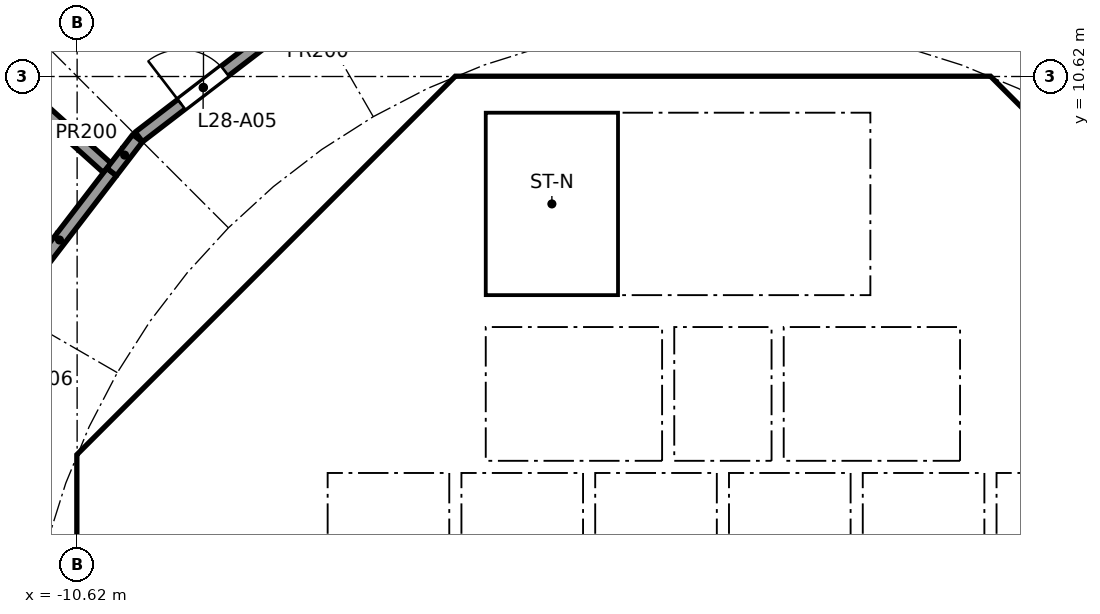
"""IFC4 building model, lengths in metres.
Left out: names, types, materials, properties, quantities, classifications, styles, units other than length and angle.
Written with IfcOpenShell. Run it as: python <this file> out.ifc"""

import sys

from ifc_helpers import new_model, si_unit, direction, frame, frame_2d, origin, place, context, subcontext, project, spatial, polyline, rectangle, outline, extrude, element, fill, save


model = new_model("IFC4")
c1 = context("Model", 3, precision=1e-05, world=origin(), true_north=direction((0.0, 1.0)))
c2 = subcontext(c1, "Body", "Model", "MODEL_VIEW")
j1 = project(units=[si_unit("LENGTHUNIT", "METRE"), si_unit("PLANEANGLEUNIT", "RADIAN")], contexts=[c1])
p1 = place(None, origin())
s1 = spatial("IfcSite", under=j1, at=p1, CompositionType="ELEMENT")
p2 = place(p1, origin())
s2 = spatial("IfcBuilding", under=s1, at=p2, CompositionType="ELEMENT")
p3 = place(p2, frame((0.0, 0.0, 114.0)))
s3 = spatial("IfcBuildingStorey", under=s2, at=p3, CompositionType="ELEMENT", Elevation=114.0)
p4 = place(p3, frame((9.988, 4.613, 0.0), z_axis=(0.0, 0.0, 1.0), x_axis=(-0.707106781187, 0.707106781187, 0.0)))
e1 = element("IfcWall", 1, at=p4, inside=s3, PredefinedType="SHEAR", context=c2, shape_type="SweptSolid", body=[
    extrude(rectangle(XDim=7.602, YDim=0.6, at=frame_2d((3.801, 0.0))), origin(), (0.0, 0.0, 1.0), 5.34),
])
p5 = place(p4, frame((3.201, 0.0, 0.0)))
e2 = element("IfcOpeningElement", 2, at=p5, cuts=e1, PredefinedType="OPENING", context=c2, shape_type="SweptSolid", body=[
    extrude(rectangle(XDim=1.2, YDim=2.1, at=frame_2d((0.6, 1.05))), frame((0.0, 0.31, 0.0), z_axis=(0.0, -1.0, 0.0), x_axis=(1.0, 0.0, 0.0)), (0.0, 0.0, 1.0), 0.62),
])
p6 = place(p3, frame((-4.613, 9.988, 0.0), z_axis=(0.0, 0.0, 1.0), x_axis=(-0.707106781187, -0.707106781187, 0.0)))
e3 = element("IfcWall", 3, at=p6, inside=s3, PredefinedType="SHEAR", context=c2, shape_type="SweptSolid", body=[
    extrude(rectangle(XDim=7.602, YDim=0.6, at=frame_2d((3.801, 0.0))), origin(), (0.0, 0.0, 1.0), 5.34),
])
p7 = place(p6, frame((0.351, 0.0, 0.0)))
e4 = element("IfcOpeningElement", 4, at=p7, cuts=e3, PredefinedType="OPENING", context=c2, shape_type="SweptSolid", body=[
    extrude(rectangle(XDim=1.1, YDim=2.1, at=frame_2d((0.55, 1.05))), frame((0.0, 0.31, 0.0), z_axis=(0.0, -1.0, 0.0), x_axis=(1.0, 0.0, 0.0)), (0.0, 0.0, 1.0), 0.62),
])
p8 = place(p3, frame((-10.325, 3.801, 0.0), z_axis=(0.0, 0.0, 1.0), x_axis=(0.0, -1.0, 0.0)))
e5 = element("IfcWall", 5, at=p8, inside=s3, PredefinedType="SHEAR", context=c2, shape_type="SweptSolid", body=[
    extrude(rectangle(XDim=7.602, YDim=0.6, at=frame_2d((3.801, 0.0))), origin(), (0.0, 0.0, 1.0), 5.34),
])
p9 = place(p8, frame((0.651, 0.0, 0.0)))
e6 = element("IfcOpeningElement", 6, at=p9, cuts=e5, PredefinedType="OPENING", context=c2, shape_type="SweptSolid", body=[
    extrude(rectangle(XDim=1.5, YDim=2.1, at=frame_2d((0.75, 1.05))), frame((0.0, 0.31, 0.0), z_axis=(0.0, -1.0, 0.0), x_axis=(1.0, 0.0, 0.0)), (0.0, 0.0, 1.0), 0.62),
])
p10 = place(p8, frame((5.451, 0.0, 0.0)))
e7 = element("IfcOpeningElement", 7, at=p10, cuts=e5, PredefinedType="OPENING", context=c2, shape_type="SweptSolid", body=[
    extrude(rectangle(XDim=1.5, YDim=2.1, at=frame_2d((0.75, 1.05))), frame((0.0, 0.31, 0.0), z_axis=(0.0, -1.0, 0.0), x_axis=(1.0, 0.0, 0.0)), (0.0, 0.0, 1.0), 0.62),
])
p11 = place(p3, frame((-5.8, 4.3, 0.0), z_axis=(0.0, 0.0, 1.0), x_axis=(0.0, 1.0, 0.0)))
e8 = element("IfcWall", 8, at=p11, inside=s3, PredefinedType="PARTITIONING", context=c2, shape_type="SweptSolid", body=[
    extrude(rectangle(XDim=3.927, YDim=0.15, at=frame_2d((1.963, 0.0))), origin(), (0.0, 0.0, 1.0), 5.34),
])
p12 = place(p11, frame((1.551, 0.0, 0.0)))
e9 = element("IfcOpeningElement", 9, at=p12, cuts=e8, PredefinedType="OPENING", context=c2, shape_type="SweptSolid", body=[
    extrude(rectangle(XDim=0.9, YDim=2.1, at=frame_2d((0.45, 1.05))), frame((0.0, 0.085, 0.0), z_axis=(0.0, -1.0, 0.0), x_axis=(1.0, 0.0, 0.0)), (0.0, 0.0, 1.0), 0.17),
])
p13 = place(p3, frame((4.0, 4.3, 0.0), z_axis=(0.0, 0.0, 1.0), x_axis=(0.0, 1.0, 0.0)))
e10 = element("IfcWall", 10, at=p13, inside=s3, PredefinedType="SOLIDWALL", context=c2, shape_type="SweptSolid", body=[
    extrude(rectangle(XDim=2.2, YDim=0.2, at=frame_2d((1.1, 0.0))), origin(), (0.0, 0.0, 1.0), 5.34),
])
p14 = place(p13, frame((0.55, 0.0, 0.0)))
e11 = element("IfcOpeningElement", 11, at=p14, cuts=e10, PredefinedType="OPENING", context=c2, shape_type="SweptSolid", body=[
    extrude(rectangle(XDim=1.1, YDim=2.1, at=frame_2d((0.55, 1.05))), frame((0.0, 0.11, 0.0), z_axis=(0.0, -1.0, 0.0), x_axis=(1.0, 0.0, 0.0)), (0.0, 0.0, 1.0), 0.22),
])
p15 = place(p3, frame((-4.0, 4.3, 0.0), z_axis=(0.0, 0.0, 1.0), x_axis=(0.0, 1.0, 0.0)))
e12 = element("IfcWall", 12, at=p15, inside=s3, PredefinedType="SOLIDWALL", context=c2, shape_type="SweptSolid", body=[
    extrude(rectangle(XDim=2.2, YDim=0.2, at=frame_2d((1.1, 0.0))), origin(), (0.0, 0.0, 1.0), 5.34),
])
p16 = place(p15, frame((0.55, 0.0, 0.0)))
e13 = element("IfcOpeningElement", 13, at=p16, cuts=e12, PredefinedType="OPENING", context=c2, shape_type="SweptSolid", body=[
    extrude(rectangle(XDim=1.1, YDim=2.1, at=frame_2d((0.55, 1.05))), frame((0.0, 0.11, 0.0), z_axis=(0.0, -1.0, 0.0), x_axis=(1.0, 0.0, 0.0)), (0.0, 0.0, 1.0), 0.22),
])
p17 = place(p3, frame((4.0, 7.025, 0.0), z_axis=(0.0, 0.0, 1.0), x_axis=(0.0, 1.0, 0.0)))
e14 = element("IfcWall", 14, at=p17, inside=s3, PredefinedType="SOLIDWALL", context=c2, shape_type="SweptSolid", body=[
    extrude(rectangle(XDim=3.0, YDim=0.2, at=frame_2d((1.5, 0.0))), origin(), (0.0, 0.0, 1.0), 5.34),
])
p18 = place(p17, frame((0.925, 0.0, 0.0)))
e15 = element("IfcOpeningElement", 15, at=p18, cuts=e14, PredefinedType="OPENING", context=c2, shape_type="SweptSolid", body=[
    extrude(rectangle(XDim=1.1, YDim=2.1, at=frame_2d((0.55, 1.05))), frame((0.0, 0.11, 0.0), z_axis=(0.0, -1.0, 0.0), x_axis=(1.0, 0.0, 0.0)), (0.0, 0.0, 1.0), 0.22),
])
p19 = place(p3, origin())
e16 = element("IfcWall", 16, at=p19, inside=s3, PredefinedType="SHEAR", context=c2, shape_type="SweptSolid", body=[
    extrude(outline(polyline([(-10.2, 4.825), (-9.776, 4.401), (-10.025, 4.152), (-10.025, 3.801), (-10.625, 3.801), (-10.625, 4.401), (-10.2, 4.825)])), origin(), (0.0, 0.0, 1.0), 5.34),
])
p20 = place(p3, origin())
e17 = element("IfcWall", 17, at=p20, inside=s3, PredefinedType="SHEAR", context=c2, shape_type="SweptSolid", body=[
    extrude(outline(polyline([(-4.152, 10.025), (-4.401, 9.776), (-4.825, 10.2), (-4.401, 10.625), (4.401, 10.625), (4.825, 10.2), (4.401, 9.776), (4.152, 10.025), (-4.152, 10.025)])), origin(), (0.0, 0.0, 1.0), 5.34),
])
for number, where, z_axis, x_axis in (
    (18, (-0.9, 4.3, 0.0), (0.0, 0.0, 1.0), (0.0, 1.0, 0.0)),
    (19, (0.9, 4.3, 0.0), (0.0, 0.0, 1.0), (0.0, 1.0, 0.0)),
):
    element("IfcWall", number, at=place(p3, frame(where, z_axis=z_axis, x_axis=x_axis)), inside=s3, PredefinedType="SOLIDWALL", context=c2, shape_type="SweptSolid", body=[
        extrude(rectangle(XDim=2.2, YDim=0.2, at=frame_2d((1.1, 0.0))), origin(), (0.0, 0.0, 1.0), 5.34),
    ])
p21 = place(p3, origin())
e20 = element("IfcWall", 20, at=p21, inside=s3, PredefinedType="SOLIDWALL", context=c2, shape_type="SweptSolid", body=[
    extrude(outline(polyline([(-6.5, 2.1), (-6.7, 2.1), (-6.7, 4.3), (6.7, 4.3), (6.7, 2.1), (6.5, 2.1), (6.5, 4.1), (4.5, 4.1), (4.5, 2.1), (4.3, 2.1), (4.3, 4.1), (2.3, 4.1), (2.3, 2.1), (2.1, 2.1), (2.1, 4.1), (0.1, 4.1), (0.1, 2.1), (-0.1, 2.1), (-0.1, 4.1), (-2.1, 4.1), (-2.1, 2.1), (-2.3, 2.1), (-2.3, 4.1), (-4.3, 4.1), (-4.3, 2.1), (-4.5, 2.1), (-4.5, 4.1), (-6.5, 4.1), (-6.5, 2.1)])), origin(), (0.0, 0.0, 1.0), 5.34),
])
p22 = place(p3, frame((-10.025, 4.0, 0.0), z_axis=(0.0, 0.0, 1.0), x_axis=(1.0, 0.0, 0.0)))
e21 = element("IfcWall", 21, at=p22, inside=s3, PredefinedType="PARTITIONING", context=c2, shape_type="SweptSolid", body=[
    extrude(rectangle(XDim=3.325, YDim=0.2, at=frame_2d((1.662, 0.0))), origin(), (0.0, 0.0, 1.0), 5.34),
])
p23 = place(p3, origin())
e22 = element("IfcWall", 22, at=p23, inside=s3, PredefinedType="SOLIDWALL", context=c2, shape_type="SweptSolid", body=[
    extrude(outline(polyline([(-3.9, 7.025), (-4.1, 7.025), (-4.1, 10.025), (-3.9, 10.025), (-3.9, 7.025)])), origin(), (0.0, 0.0, 1.0), 5.34),
])
p24 = place(p3, origin())
e23 = element("IfcWall", 23, at=p24, inside=s3, PredefinedType="SOLIDWALL", context=c2, shape_type="SweptSolid", body=[
    extrude(outline(polyline([(4.1, 6.5), (-4.1, 6.5), (-4.1, 7.025), (4.1, 7.025), (4.1, 6.5)])), origin(), (0.0, 0.0, 1.0), 5.34),
])
p25 = place(p3, frame((-11.769, 6.812, 0.0), z_axis=(0.0, 0.0, 1.0), x_axis=(0.608714921409, 0.793389024662, 0.0)))
e24 = element("IfcWall", 24, at=p25, inside=s3, PredefinedType="PARTITIONING", context=c2, shape_type="SweptSolid", body=[
    extrude(rectangle(XDim=2.821, YDim=0.2, at=frame_2d((1.411, 0.0))), origin(), (0.0, 0.0, 1.0), 5.34),
])
p26 = place(p3, frame((-10.126, 9.117, 0.0), z_axis=(0.0, 0.0, 1.0), x_axis=(-0.743152798172, 0.669121751679, 0.0)))
e25 = element("IfcWall", 25, at=p26, inside=s3, PredefinedType="PARTITIONING", context=c2, shape_type="SweptSolid", body=[
    extrude(rectangle(XDim=18.725, YDim=0.2, at=frame_2d((9.363, 0.0))), origin(), (0.0, 0.0, 1.0), 4.728),
])
p27 = place(p3, frame((-10.051, 9.05, 0.0), z_axis=(0.0, 0.0, 1.0), x_axis=(0.608629566887, 0.793454504248, 0.0)))
e26 = element("IfcWall", 26, at=p27, inside=s3, PredefinedType="PARTITIONING", context=c2, shape_type="SweptSolid", body=[
    extrude(rectangle(XDim=0.699, YDim=0.2, at=frame_2d((0.349, 0.0))), origin(), (0.0, 0.0, 1.0), 5.34),
])
p28 = place(p3, frame((-9.605, 9.626, 0.0), z_axis=(0.0, 0.0, 1.0), x_axis=(0.793412701193, 0.608684060564, 0.0)))
e27 = element("IfcWall", 27, at=p28, inside=s3, PredefinedType="PARTITIONING", context=c2, shape_type="SweptSolid", body=[
    extrude(rectangle(XDim=2.679, YDim=0.2, at=frame_2d((1.339, 0.0))), origin(), (0.0, 0.0, 1.0), 5.34),
])
p29 = place(p28, frame((0.882, 0.0, 0.0)))
e28 = element("IfcOpeningElement", 28, at=p29, cuts=e27, PredefinedType="OPENING", context=c2, shape_type="SweptSolid", body=[
    extrude(rectangle(XDim=0.9, YDim=2.1, at=frame_2d((0.45, 1.05))), frame((0.0, 0.11, 0.0), z_axis=(0.0, -1.0, 0.0), x_axis=(1.0, 0.0, 0.0)), (0.0, 0.0, 1.0), 0.22),
])
p30 = place(p14, origin())
e29 = element("IfcDoor", 29, at=p30, inside=s3, OperationType="DOUBLE_DOOR_SLIDING", PredefinedType="DOOR", context=c2, shape_type="SweptSolid", body=[
    extrude(rectangle(XDim=1.1, YDim=2.1, at=frame_2d((0.55, 1.05))), frame((0.0, 0.025, 0.0), z_axis=(0.0, -1.0, 0.0), x_axis=(1.0, 0.0, 0.0)), (0.0, 0.0, 1.0), 0.05),
])
fill(e11, e29)
p31 = place(p16, origin())
e30 = element("IfcDoor", 30, at=p31, inside=s3, OperationType="DOUBLE_DOOR_SLIDING", PredefinedType="DOOR", context=c2, shape_type="SweptSolid", body=[
    extrude(rectangle(XDim=1.1, YDim=2.1, at=frame_2d((0.55, 1.05))), frame((0.0, 0.025, 0.0), z_axis=(0.0, -1.0, 0.0), x_axis=(1.0, 0.0, 0.0)), (0.0, 0.0, 1.0), 0.05),
])
fill(e13, e30)
p32 = place(p18, origin())
e31 = element("IfcDoor", 31, at=p32, inside=s3, OperationType="SINGLE_SWING_LEFT", PredefinedType="DOOR", context=c2, shape_type="SweptSolid", body=[
    extrude(rectangle(XDim=1.1, YDim=2.1, at=frame_2d((0.55, 1.05))), frame((0.0, 0.025, 0.0), z_axis=(0.0, -1.0, 0.0), x_axis=(1.0, 0.0, 0.0)), (0.0, 0.0, 1.0), 0.05),
])
fill(e15, e31)
p33 = place(p12, origin())
e32 = element("IfcDoor", 32, at=p33, inside=s3, OperationType="SINGLE_SWING_RIGHT", PredefinedType="DOOR", context=c2, shape_type="SweptSolid", body=[
    extrude(rectangle(XDim=0.9, YDim=2.1, at=frame_2d((0.45, 1.05))), frame((0.0, 0.025, 0.0), z_axis=(0.0, -1.0, 0.0), x_axis=(1.0, 0.0, 0.0)), (0.0, 0.0, 1.0), 0.05),
])
fill(e9, e32)
p34 = place(p9, origin())
e33 = element("IfcDoor", 33, at=p34, inside=s3, OperationType="DOUBLE_DOOR_SINGLE_SWING", PredefinedType="DOOR", context=c2, shape_type="SweptSolid", body=[
    extrude(rectangle(XDim=1.5, YDim=2.1, at=frame_2d((0.75, 1.05))), frame((0.0, 0.025, 0.0), z_axis=(0.0, -1.0, 0.0), x_axis=(1.0, 0.0, 0.0)), (0.0, 0.0, 1.0), 0.05),
])
fill(e6, e33)
p35 = place(p7, origin())
e34 = element("IfcDoor", 34, at=p35, inside=s3, OperationType="SINGLE_SWING_RIGHT", PredefinedType="DOOR", context=c2, shape_type="SweptSolid", body=[
    extrude(rectangle(XDim=1.1, YDim=2.1, at=frame_2d((0.55, 1.05))), frame((0.0, 0.025, 0.0), z_axis=(0.0, -1.0, 0.0), x_axis=(1.0, 0.0, 0.0)), (0.0, 0.0, 1.0), 0.05),
])
fill(e4, e34)
p36 = place(p29, origin())
e35 = element("IfcDoor", 35, at=p36, inside=s3, OperationType="SINGLE_SWING_LEFT", PredefinedType="DOOR", context=c2, shape_type="SweptSolid", body=[
    extrude(rectangle(XDim=0.9, YDim=2.1, at=frame_2d((0.45, 1.05))), frame((0.0, 0.025, 0.0), z_axis=(0.0, -1.0, 0.0), x_axis=(1.0, 0.0, 0.0)), (0.0, 0.0, 1.0), 0.05),
])
fill(e28, e35)
save(model, sys.argv[1])
